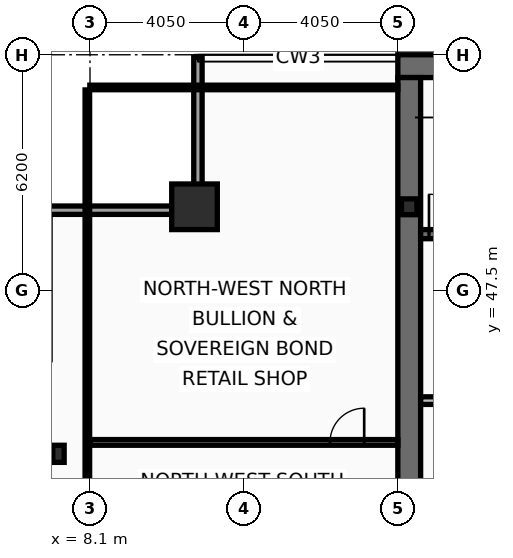
"""IFC4 building model, lengths in metres.
Left out: names, types, materials, properties, quantities, classifications, styles, units other than length and angle.
Written with IfcOpenShell. Run it as: python <this file> out.ifc"""

import sys

from ifc_helpers import new_model, si_unit, direction, frame, frame_2d, origin, origin_2d, place, context, subcontext, project, spatial, rectangle, hollow_rectangle, i_section, extrude, element, fill, save


model = new_model("IFC4")
c1 = context("Model", 3, precision=1e-05, world=origin(), true_north=direction((0.0, 1.0)))
c2 = subcontext(c1, "Body", "Model", "MODEL_VIEW")
j1 = project(units=[si_unit("LENGTHUNIT", "METRE"), si_unit("PLANEANGLEUNIT", "RADIAN")], contexts=[c1])
p1 = place(None, origin())
s1 = spatial("IfcSite", under=j1, at=p1, CompositionType="ELEMENT")
p2 = place(p1, origin())
s2 = spatial("IfcBuilding", under=s1, at=p2, CompositionType="ELEMENT")
p3 = place(p2, frame((0.0, 0.0, 195.8)))
s3 = spatial("IfcBuildingStorey", under=s2, at=p3, CompositionType="ELEMENT", Elevation=195.8)
p4 = place(p3, frame((16.2, 53.4, 0.0), z_axis=(0.0, 0.0, 1.0), x_axis=(1.0, 0.0, 0.0)))
e1 = element("IfcWall", 1, at=p4, inside=s3, PredefinedType="SHEAR", context=c2, shape_type="SweptSolid", body=[
    extrude(rectangle(XDim=40.5, YDim=0.6, at=frame_2d((20.25, 0.0))), origin(), (0.0, 0.0, 1.0), 3.44),
])
p5 = place(p3, frame((16.5, 41.9, 0.0), z_axis=(0.0, 0.0, 1.0), x_axis=(0.0, 1.0, 0.0)))
e2 = element("IfcWall", 2, at=p5, inside=s3, PredefinedType="SHEAR", context=c2, shape_type="SweptSolid", body=[
    extrude(rectangle(XDim=11.2, YDim=0.6, at=frame_2d((5.6, 0.0))), origin(), (0.0, 0.0, 1.0), 3.44),
])
p6 = place(p3, frame((16.8, 48.98, 0.0), z_axis=(0.0, 0.0, 1.0), x_axis=(1.0, 0.0, 0.0)))
e3 = element("IfcWall", 3, at=p6, inside=s3, PredefinedType="SHEAR", context=c2, shape_type="SweptSolid", body=[
    extrude(rectangle(XDim=7.42, YDim=0.24, at=frame_2d((3.71, 0.0))), origin(), (0.0, 0.0, 1.0), 3.44),
])
p7 = place(p6, frame((0.22, 0.0, 0.0)))
e4 = element("IfcOpeningElement", 4, at=p7, cuts=e3, PredefinedType="OPENING", context=c2, shape_type="SweptSolid", body=[
    extrude(rectangle(XDim=1.05, YDim=2.15, at=frame_2d((0.525, 1.075))), frame((0.0, 0.13, 0.0), z_axis=(0.0, -1.0, 0.0), x_axis=(1.0, 0.0, 0.0)), (0.0, 0.0, 1.0), 0.26),
])
p8 = place(p3, frame((10.85, 49.7, 0.0), z_axis=(0.0, 0.0, 1.0), x_axis=(1.0, 0.0, 0.0)))
e5 = element("IfcColumn", 5, at=p8, inside=s3, PredefinedType="COLUMN", context=c2, shape_type="SweptSolid", body=[
    extrude(hollow_rectangle(XDim=1.2, YDim=1.2, WallThickness=0.06, at=origin_2d()), origin(), (0.0, 0.0, 1.0), 3.6),
])
p9 = place(p3, frame((7.27, 43.2, 0.0), z_axis=(0.0, 0.0, 1.0), x_axis=(1.0, 0.0, 0.0)))
e6 = element("IfcColumn", 6, at=p9, inside=s3, PredefinedType="COLUMN", context=c2, shape_type="SweptSolid", body=[
    extrude(i_section(OverallWidth=0.3, OverallDepth=0.45, WebThickness=0.014, FlangeThickness=0.026, at=origin_2d()), origin(), (0.0, 0.0, 1.0), 3.6),
])
p10 = place(p3, frame((16.5, 49.7, 0.0), z_axis=(0.0, 0.0, 1.0), x_axis=(1.0, 0.0, 0.0)))
e7 = element("IfcColumn", 7, at=p10, inside=s3, PredefinedType="COLUMN", context=c2, shape_type="SweptSolid", body=[
    extrude(i_section(OverallWidth=0.406, OverallDepth=0.416, WebThickness=0.03, FlangeThickness=0.048, at=origin_2d()), origin(), (0.0, 0.0, 1.0), 3.6),
])
p11 = place(p3, frame((6.83, 49.61, 0.0), z_axis=(0.0, 0.0, 1.0), x_axis=(1.0, 0.0, 0.0)))
e8 = element("IfcWall", 8, at=p11, inside=s3, PredefinedType="SOLIDWALL", context=c2, shape_type="SweptSolid", body=[
    extrude(rectangle(XDim=4.22, YDim=0.22, at=frame_2d((2.11, 0.0))), origin(), (0.0, 0.0, 1.0), 2.83),
])
p12 = place(p3, frame((10.94, 49.72, 0.0), z_axis=(0.0, 0.0, 1.0), x_axis=(0.0, 1.0, 0.0)))
e9 = element("IfcWall", 9, at=p12, inside=s3, PredefinedType="SOLIDWALL", context=c2, shape_type="SweptSolid", body=[
    extrude(rectangle(XDim=3.91, YDim=0.22, at=frame_2d((1.955, 0.0))), origin(), (0.0, 0.0, 1.0), 2.83),
])
p13 = place(p3, frame((16.8, 44.6, 0.0), z_axis=(0.0, 0.0, 1.0), x_axis=(1.0, 0.0, 0.0)))
e10 = element("IfcWall", 10, at=p13, inside=s3, PredefinedType="PARTITIONING", context=c2, shape_type="SweptSolid", body=[
    extrude(rectangle(XDim=4.2, YDim=0.2, at=frame_2d((2.1, 0.0))), origin(), (0.0, 0.0, 1.0), 3.44),
])
p14 = place(p13, frame((1.25, 0.0, 0.0)))
e11 = element("IfcOpeningElement", 11, at=p14, cuts=e10, PredefinedType="OPENING", context=c2, shape_type="SweptSolid", body=[
    extrude(rectangle(XDim=1.05, YDim=2.15, at=frame_2d((0.525, 1.075))), frame((0.0, 0.11, 0.0), z_axis=(0.0, -1.0, 0.0), x_axis=(1.0, 0.0, 0.0)), (0.0, 0.0, 1.0), 0.22),
])
p15 = place(p3, frame((8.095, 43.5, 0.0), z_axis=(0.0, 0.0, 1.0), x_axis=(1.0, 0.0, 0.0)))
e12 = element("IfcWall", 12, at=p15, inside=s3, PredefinedType="PARTITIONING", context=c2, shape_type="SweptSolid", body=[
    extrude(rectangle(XDim=8.105, YDim=0.15, at=frame_2d((4.052, 0.0))), origin(), (0.0, 0.0, 1.0), 2.73),
])
p16 = place(p15, frame((6.32, 0.0, 0.0)))
e13 = element("IfcOpeningElement", 13, at=p16, cuts=e12, PredefinedType="OPENING", context=c2, shape_type="SweptSolid", body=[
    extrude(rectangle(XDim=0.9, YDim=2.05, at=frame_2d((0.45, 1.025))), frame((0.0, 0.085, 0.0), z_axis=(0.0, -1.0, 0.0), x_axis=(1.0, 0.0, 0.0)), (0.0, 0.0, 1.0), 0.17),
])
p17 = place(p3, frame((8.03, 10.665, 0.0), z_axis=(0.0, 0.0, 1.0), x_axis=(0.0, 1.0, 0.0)))
e14 = element("IfcWall", 14, at=p17, inside=s3, PredefinedType="PARTITIONING", context=c2, shape_type="SweptSolid", body=[
    extrude(rectangle(XDim=42.11, YDim=0.12, at=frame_2d((21.055, 0.0))), origin(), (0.0, 0.0, 1.0), 2.73),
])
p18 = place(p3, frame((8.095, 52.84, 0.0), z_axis=(0.0, 0.0, 1.0), x_axis=(1.0, 0.0, 0.0)))
e15 = element("IfcWall", 15, at=p18, inside=s3, PredefinedType="PARTITIONING", context=c2, shape_type="SweptSolid", body=[
    extrude(rectangle(XDim=8.105, YDim=0.12, at=frame_2d((4.052, 0.0))), origin(), (0.0, 0.0, 1.0), 3.44),
])
p19 = place(p7, origin())
e16 = element("IfcDoor", 16, at=p19, inside=s3, OperationType="SINGLE_SWING_LEFT", PredefinedType="DOOR", context=c2, shape_type="SweptSolid", body=[
    extrude(rectangle(XDim=1.05, YDim=2.15, at=frame_2d((0.525, 1.075))), frame((0.0, 0.025, 0.0), z_axis=(0.0, -1.0, 0.0), x_axis=(1.0, 0.0, 0.0)), (0.0, 0.0, 1.0), 0.05),
])
fill(e4, e16)
p20 = place(p16, origin())
e17 = element("IfcDoor", 17, at=p20, inside=s3, OperationType="SINGLE_SWING_RIGHT", PredefinedType="DOOR", context=c2, shape_type="SweptSolid", body=[
    extrude(rectangle(XDim=0.9, YDim=2.05, at=frame_2d((0.45, 1.025))), frame((0.0, 0.025, 0.0), z_axis=(0.0, -1.0, 0.0), x_axis=(1.0, 0.0, 0.0)), (0.0, 0.0, 1.0), 0.05),
])
fill(e13, e17)
save(model, sys.argv[1])
